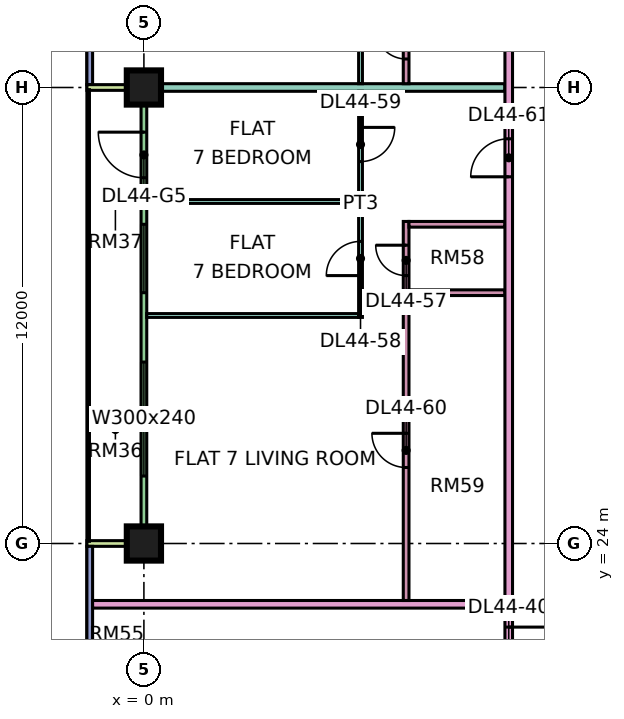
"""IFC4 building model, lengths in metres.
Left out: names, types, materials, properties, quantities, classifications, styles, units other than length and angle.
Written with IfcOpenShell. Run it as: python <this file> out.ifc"""

import sys

from ifc_helpers import new_model, si_unit, direction, frame, frame_2d, origin, origin_2d, place, context, subcontext, project, spatial, rectangle, extrude, element, fill, save


model = new_model("IFC4")
c1 = context("Model", 3, precision=1e-05, world=origin(), true_north=direction((0.0, 1.0)))
c2 = subcontext(c1, "Body", "Model", "MODEL_VIEW")
j1 = project(units=[si_unit("LENGTHUNIT", "METRE"), si_unit("PLANEANGLEUNIT", "RADIAN")], contexts=[c1])
p1 = place(None, origin())
s1 = spatial("IfcSite", under=j1, at=p1, CompositionType="ELEMENT")
p2 = place(p1, origin())
s2 = spatial("IfcBuilding", under=s1, at=p2, CompositionType="ELEMENT")
p3 = place(p2, frame((0.0, 0.0, 191.15)))
s3 = spatial("IfcBuildingStorey", under=s2, at=p3, CompositionType="ELEMENT", Elevation=191.15)
p4 = place(p3, frame((0.0, 24.0, 0.0), z_axis=(0.0, 0.0, 1.0), x_axis=(1.0, 0.0, 0.0)))
e1 = element("IfcColumn", 1, at=p4, inside=s3, PredefinedType="COLUMN", context=c2, shape_type="SweptSolid", body=[
    extrude(rectangle(XDim=0.9, YDim=0.9, at=origin_2d()), origin(), (0.0, 0.0, 1.0), 3.75),
])
p5 = place(p3, frame((0.0, 36.0, 0.0), z_axis=(0.0, 0.0, 1.0), x_axis=(1.0, 0.0, 0.0)))
e2 = element("IfcColumn", 2, at=p5, inside=s3, PredefinedType="COLUMN", context=c2, shape_type="SweptSolid", body=[
    extrude(rectangle(XDim=0.9, YDim=0.9, at=origin_2d()), origin(), (0.0, 0.0, 1.0), 3.75),
])
p6 = place(p3, frame((-1.425, 47.925, 0.0), z_axis=(0.0, 0.0, 1.0), x_axis=(0.0, -1.0, 0.0)))
e3 = element("IfcWall", 3, at=p6, inside=s3, PredefinedType="SOLIDWALL", context=c2, shape_type="SweptSolid", body=[
    extrude(rectangle(XDim=11.85, YDim=0.15, at=frame_2d((5.925, 0.0))), origin(), (0.0, 0.0, 1.0), 3.35),
])
p7 = place(p6, frame((0.562, 0.0, 0.45)))
e4 = element("IfcOpeningElement", 4, at=p7, cuts=e3, PredefinedType="OPENING", context=c2, shape_type="SweptSolid", body=[
    extrude(rectangle(XDim=1.8, YDim=2.4, at=frame_2d((0.9, 1.2))), frame((0.0, 0.085, 0.0), z_axis=(0.0, -1.0, 0.0), x_axis=(1.0, 0.0, 0.0)), (0.0, 0.0, 1.0), 0.17),
])
p8 = place(p6, frame((5.887, 0.0, 0.45)))
e5 = element("IfcOpeningElement", 5, at=p8, cuts=e3, PredefinedType="OPENING", context=c2, shape_type="SweptSolid", body=[
    extrude(rectangle(XDim=3.0, YDim=2.4, at=frame_2d((1.5, 1.2))), frame((0.0, 0.085, 0.0), z_axis=(0.0, -1.0, 0.0), x_axis=(1.0, 0.0, 0.0)), (0.0, 0.0, 1.0), 0.17),
])
p9 = place(p3, frame((0.0, 35.925, 0.0), z_axis=(0.0, 0.0, 1.0), x_axis=(0.0, -1.0, 0.0)))
e6 = element("IfcWall", 6, at=p9, inside=s3, PredefinedType="SOLIDWALL", context=c2, shape_type="SweptSolid", body=[
    extrude(rectangle(XDim=11.85, YDim=0.15, at=frame_2d((5.925, 0.0))), origin(), (0.0, 0.0, 1.0), 3.35),
])
p10 = place(p9, frame((1.1, 0.0, 0.0)))
e7 = element("IfcOpeningElement", 7, at=p10, cuts=e6, PredefinedType="OPENING", context=c2, shape_type="SweptSolid", body=[
    extrude(rectangle(XDim=1.2, YDim=2.4, at=frame_2d((0.6, 1.2))), frame((0.0, 0.085, 0.0), z_axis=(0.0, -1.0, 0.0), x_axis=(1.0, 0.0, 0.0)), (0.0, 0.0, 1.0), 0.17),
])
p11 = place(p9, frame((3.525, 0.0, 0.45)))
e8 = element("IfcOpeningElement", 8, at=p11, cuts=e6, PredefinedType="OPENING", context=c2, shape_type="SweptSolid", body=[
    extrude(rectangle(XDim=1.8, YDim=2.4, at=frame_2d((0.9, 1.2))), frame((0.0, 0.085, 0.0), z_axis=(0.0, -1.0, 0.0), x_axis=(1.0, 0.0, 0.0)), (0.0, 0.0, 1.0), 0.17),
])
p12 = place(p9, frame((7.15, 0.0, 0.45)))
e9 = element("IfcOpeningElement", 9, at=p12, cuts=e6, PredefinedType="OPENING", context=c2, shape_type="SweptSolid", body=[
    extrude(rectangle(XDim=3.0, YDim=2.4, at=frame_2d((1.5, 1.2))), frame((0.0, 0.085, 0.0), z_axis=(0.0, -1.0, 0.0), x_axis=(1.0, 0.0, 0.0)), (0.0, 0.0, 1.0), 0.17),
])
for number, where, z_axis, x_axis in (
    (10, (-1.5, 36.0, 0.0), (0.0, 0.0, 1.0), (1.0, 0.0, 0.0)),
    (11, (-1.5, 24.0, 0.0), (0.0, 0.0, 1.0), (1.0, 0.0, 0.0)),
):
    element("IfcWall", number, at=place(p3, frame(where, z_axis=z_axis, x_axis=x_axis)), inside=s3, PredefinedType="SOLIDWALL", context=c2, shape_type="SweptSolid", body=[
        extrude(rectangle(XDim=1.5, YDim=0.15, at=frame_2d((0.75, 0.0))), origin(), (0.0, 0.0, 1.0), 3.35),
    ])
p13 = place(p3, frame((-1.425, 23.925, 0.0), z_axis=(0.0, 0.0, 1.0), x_axis=(0.0, -1.0, 0.0)))
e12 = element("IfcWall", 12, at=p13, inside=s3, PredefinedType="SOLIDWALL", context=c2, shape_type="SweptSolid", body=[
    extrude(rectangle(XDim=11.425, YDim=0.15, at=frame_2d((5.712, 0.0))), origin(), (0.0, 0.0, 1.0), 3.35),
])
p14 = place(p13, frame((6.175, 0.0, 0.45)))
e13 = element("IfcOpeningElement", 13, at=p14, cuts=e12, PredefinedType="OPENING", context=c2, shape_type="SweptSolid", body=[
    extrude(rectangle(XDim=3.0, YDim=2.4, at=frame_2d((1.5, 1.2))), frame((0.0, 0.085, 0.0), z_axis=(0.0, -1.0, 0.0), x_axis=(1.0, 0.0, 0.0)), (0.0, 0.0, 1.0), 0.17),
])
p15 = place(p3, frame((-1.35, 22.4, 0.0), z_axis=(0.0, 0.0, 1.0), x_axis=(1.0, 0.0, 0.0)))
e14 = element("IfcWall", 14, at=p15, inside=s3, PredefinedType="PARTITIONING", context=c2, shape_type="SweptSolid", body=[
    extrude(rectangle(XDim=10.85, YDim=0.2, at=frame_2d((5.425, 0.0))), origin(), (0.0, 0.0, 1.0), 3.35),
])
e15 = element("IfcWall", 15, at=p5, inside=s3, PredefinedType="PARTITIONING", context=c2, shape_type="SweptSolid", body=[
    extrude(rectangle(XDim=9.5, YDim=0.2, at=frame_2d((4.75, 0.0))), origin(), (0.0, 0.0, 1.0), 3.35),
])
for number, where, z_axis, x_axis in (
    (16, (0.074, 30.0, 0.0), (0.0, 0.0, 1.0), (1.0, 0.0, 0.0)),
    (17, (0.074, 33.0, 0.0), (0.0, 0.0, 1.0), (1.0, 0.0, 0.0)),
):
    element("IfcWall", number, at=place(p3, frame(where, z_axis=z_axis, x_axis=x_axis)), inside=s3, PredefinedType="PARTITIONING", context=c2, shape_type="SweptSolid", body=[
        extrude(rectangle(XDim=5.576, YDim=0.1, at=frame_2d((2.788, 0.0))), origin(), (0.0, 0.0, 1.0), 3.35),
    ])
p16 = place(p3, frame((5.7, 29.95, 0.0), z_axis=(0.0, 0.0, 1.0), x_axis=(0.0, 1.0, 0.0)))
e18 = element("IfcWall", 18, at=p16, inside=s3, PredefinedType="PARTITIONING", context=c2, shape_type="SweptSolid", body=[
    extrude(rectangle(XDim=5.95, YDim=0.1, at=frame_2d((2.975, 0.0))), origin(), (0.0, 0.0, 1.0), 3.35),
])
p17 = place(p16, frame((1.1, 0.0, 0.0)))
e19 = element("IfcOpeningElement", 19, at=p17, cuts=e18, PredefinedType="OPENING", context=c2, shape_type="SweptSolid", body=[
    extrude(rectangle(XDim=0.9, YDim=2.1, at=frame_2d((0.45, 1.05))), frame((0.0, 0.06, 0.0), z_axis=(0.0, -1.0, 0.0), x_axis=(1.0, 0.0, 0.0)), (0.0, 0.0, 1.0), 0.12),
])
p18 = place(p16, frame((4.1, 0.0, 0.0)))
e20 = element("IfcOpeningElement", 20, at=p18, cuts=e18, PredefinedType="OPENING", context=c2, shape_type="SweptSolid", body=[
    extrude(rectangle(XDim=0.9, YDim=2.1, at=frame_2d((0.45, 1.05))), frame((0.0, 0.06, 0.0), z_axis=(0.0, -1.0, 0.0), x_axis=(1.0, 0.0, 0.0)), (0.0, 0.0, 1.0), 0.12),
])
p19 = place(p3, frame((5.7, 36.1, 0.0), z_axis=(0.0, 0.0, 1.0), x_axis=(0.0, 1.0, 0.0)))
e21 = element("IfcWall", 21, at=p19, inside=s3, PredefinedType="PARTITIONING", context=c2, shape_type="SweptSolid", body=[
    extrude(rectangle(XDim=26.826, YDim=0.1, at=frame_2d((13.413, 0.0))), origin(), (0.0, 0.0, 1.0), 3.35),
])
p20 = place(p19, frame((9.95, 0.0, 0.0)))
e22 = element("IfcOpeningElement", 22, at=p20, cuts=e21, PredefinedType="OPENING", context=c2, shape_type="SweptSolid", body=[
    extrude(rectangle(XDim=0.9, YDim=2.1, at=frame_2d((0.45, 1.05))), frame((0.0, 0.06, 0.0), z_axis=(0.0, -1.0, 0.0), x_axis=(1.0, 0.0, 0.0)), (0.0, 0.0, 1.0), 0.12),
])
p21 = place(p19, frame((12.95, 0.0, 0.0)))
e23 = element("IfcOpeningElement", 23, at=p21, cuts=e21, PredefinedType="OPENING", context=c2, shape_type="SweptSolid", body=[
    extrude(rectangle(XDim=0.9, YDim=2.1, at=frame_2d((0.45, 1.05))), frame((0.0, 0.06, 0.0), z_axis=(0.0, -1.0, 0.0), x_axis=(1.0, 0.0, 0.0)), (0.0, 0.0, 1.0), 0.12),
])
p22 = place(p19, frame((15.95, 0.0, 0.0)))
e24 = element("IfcOpeningElement", 24, at=p22, cuts=e21, PredefinedType="OPENING", context=c2, shape_type="SweptSolid", body=[
    extrude(rectangle(XDim=0.9, YDim=2.1, at=frame_2d((0.45, 1.05))), frame((0.0, 0.06, 0.0), z_axis=(0.0, -1.0, 0.0), x_axis=(1.0, 0.0, 0.0)), (0.0, 0.0, 1.0), 0.12),
])
p23 = place(p19, frame((18.95, 0.0, 0.0)))
e25 = element("IfcOpeningElement", 25, at=p23, cuts=e21, PredefinedType="OPENING", context=c2, shape_type="SweptSolid", body=[
    extrude(rectangle(XDim=0.9, YDim=2.1, at=frame_2d((0.45, 1.05))), frame((0.0, 0.06, 0.0), z_axis=(0.0, -1.0, 0.0), x_axis=(1.0, 0.0, 0.0)), (0.0, 0.0, 1.0), 0.12),
])
p24 = place(p19, frame((24.95, 0.0, 0.0)))
e26 = element("IfcOpeningElement", 26, at=p24, cuts=e21, PredefinedType="OPENING", context=c2, shape_type="SweptSolid", body=[
    extrude(rectangle(XDim=0.9, YDim=2.1, at=frame_2d((0.45, 1.05))), frame((0.0, 0.06, 0.0), z_axis=(0.0, -1.0, 0.0), x_axis=(1.0, 0.0, 0.0)), (0.0, 0.0, 1.0), 0.12),
])
p25 = place(p19, frame((3.95, 0.0, 0.0)))
e27 = element("IfcOpeningElement", 27, at=p25, cuts=e21, PredefinedType="OPENING", context=c2, shape_type="SweptSolid", body=[
    extrude(rectangle(XDim=0.9, YDim=2.1, at=frame_2d((0.45, 1.05))), frame((0.0, 0.06, 0.0), z_axis=(0.0, -1.0, 0.0), x_axis=(1.0, 0.0, 0.0)), (0.0, 0.0, 1.0), 0.12),
])
p26 = place(p19, frame((21.95, 0.0, 0.0)))
e28 = element("IfcOpeningElement", 28, at=p26, cuts=e21, PredefinedType="OPENING", context=c2, shape_type="SweptSolid", body=[
    extrude(rectangle(XDim=0.9, YDim=2.1, at=frame_2d((0.45, 1.05))), frame((0.0, 0.06, 0.0), z_axis=(0.0, -1.0, 0.0), x_axis=(1.0, 0.0, 0.0)), (0.0, 0.0, 1.0), 0.12),
])
p27 = place(p3, frame((6.9, 22.5, 0.0), z_axis=(0.0, 0.0, 1.0), x_axis=(0.0, 1.0, 0.0)))
e29 = element("IfcWall", 29, at=p27, inside=s3, PredefinedType="PARTITIONING", context=c2, shape_type="SweptSolid", body=[
    extrude(rectangle(XDim=9.975, YDim=0.15, at=frame_2d((4.988, 0.0))), origin(), (0.0, 0.0, 1.0), 3.35),
])
p28 = place(p27, frame((8.55, 0.0, 0.0)))
e30 = element("IfcOpeningElement", 30, at=p28, cuts=e29, PredefinedType="OPENING", context=c2, shape_type="SweptSolid", body=[
    extrude(rectangle(XDim=0.8, YDim=2.1, at=frame_2d((0.4, 1.05))), frame((0.0, 0.085, 0.0), z_axis=(0.0, -1.0, 0.0), x_axis=(1.0, 0.0, 0.0)), (0.0, 0.0, 1.0), 0.17),
])
p29 = place(p27, frame((3.5, 0.0, 0.0)))
e31 = element("IfcOpeningElement", 31, at=p29, cuts=e29, PredefinedType="OPENING", context=c2, shape_type="SweptSolid", body=[
    extrude(rectangle(XDim=0.9, YDim=2.1, at=frame_2d((0.45, 1.05))), frame((0.0, 0.085, 0.0), z_axis=(0.0, -1.0, 0.0), x_axis=(1.0, 0.0, 0.0)), (0.0, 0.0, 1.0), 0.17),
])
p30 = place(p3, frame((6.9, 36.1, 0.0), z_axis=(0.0, 0.0, 1.0), x_axis=(0.0, 1.0, 0.0)))
e32 = element("IfcWall", 32, at=p30, inside=s3, PredefinedType="PARTITIONING", context=c2, shape_type="SweptSolid", body=[
    extrude(rectangle(XDim=14.675, YDim=0.15, at=frame_2d((7.337, 0.0))), origin(), (0.0, 0.0, 1.0), 3.35),
])
p31 = place(p30, frame((7.55, 0.0, 0.0)))
e33 = element("IfcOpeningElement", 33, at=p31, cuts=e32, PredefinedType="OPENING", context=c2, shape_type="SweptSolid", body=[
    extrude(rectangle(XDim=0.8, YDim=2.1, at=frame_2d((0.4, 1.05))), frame((0.0, 0.085, 0.0), z_axis=(0.0, -1.0, 0.0), x_axis=(1.0, 0.0, 0.0)), (0.0, 0.0, 1.0), 0.17),
])
p32 = place(p30, frame((0.65, 0.0, 0.0)))
e34 = element("IfcOpeningElement", 34, at=p32, cuts=e32, PredefinedType="OPENING", context=c2, shape_type="SweptSolid", body=[
    extrude(rectangle(XDim=0.8, YDim=2.1, at=frame_2d((0.4, 1.05))), frame((0.0, 0.085, 0.0), z_axis=(0.0, -1.0, 0.0), x_axis=(1.0, 0.0, 0.0)), (0.0, 0.0, 1.0), 0.17),
])
p33 = place(p30, frame((10.25, 0.0, 0.0)))
e35 = element("IfcOpeningElement", 35, at=p33, cuts=e32, PredefinedType="OPENING", context=c2, shape_type="SweptSolid", body=[
    extrude(rectangle(XDim=0.8, YDim=2.1, at=frame_2d((0.4, 1.05))), frame((0.0, 0.085, 0.0), z_axis=(0.0, -1.0, 0.0), x_axis=(1.0, 0.0, 0.0)), (0.0, 0.0, 1.0), 0.17),
])
p34 = place(p30, frame((3.95, 0.0, 0.0)))
e36 = element("IfcOpeningElement", 36, at=p34, cuts=e32, PredefinedType="OPENING", context=c2, shape_type="SweptSolid", body=[
    extrude(rectangle(XDim=0.9, YDim=2.1, at=frame_2d((0.45, 1.05))), frame((0.0, 0.085, 0.0), z_axis=(0.0, -1.0, 0.0), x_axis=(1.0, 0.0, 0.0)), (0.0, 0.0, 1.0), 0.17),
])
for number, where, z_axis, x_axis in (
    (37, (6.975, 30.6, 0.0), (0.0, 0.0, 1.0), (1.0, 0.0, 0.0)),
    (38, (6.975, 32.4, 0.0), (0.0, 0.0, 1.0), (1.0, 0.0, 0.0)),
):
    element("IfcWall", number, at=place(p3, frame(where, z_axis=z_axis, x_axis=x_axis)), inside=s3, PredefinedType="PARTITIONING", context=c2, shape_type="SweptSolid", body=[
        extrude(rectangle(XDim=2.525, YDim=0.15, at=frame_2d((1.262, 0.0))), origin(), (0.0, 0.0, 1.0), 3.35),
    ])
p35 = place(p3, frame((9.6, 20.0, 0.0), z_axis=(0.0, 0.0, 1.0), x_axis=(0.0, 1.0, 0.0)))
e39 = element("IfcWall", 39, at=p35, inside=s3, PredefinedType="PARTITIONING", context=c2, shape_type="SweptSolid", body=[
    extrude(rectangle(XDim=42.926, YDim=0.2, at=frame_2d((21.463, 0.0))), origin(), (0.0, 0.0, 1.0), 3.35),
])
p36 = place(p35, frame((31.65, 0.0, 0.0)))
e40 = element("IfcOpeningElement", 40, at=p36, cuts=e39, PredefinedType="OPENING", context=c2, shape_type="SweptSolid", body=[
    extrude(rectangle(XDim=1.0, YDim=2.1, at=frame_2d((0.5, 1.05))), frame((0.0, 0.11, 0.0), z_axis=(0.0, -1.0, 0.0), x_axis=(1.0, 0.0, 0.0)), (0.0, 0.0, 1.0), 0.22),
])
p37 = place(p35, frame((0.6, 0.0, 0.0)))
e41 = element("IfcOpeningElement", 41, at=p37, cuts=e39, PredefinedType="OPENING", context=c2, shape_type="SweptSolid", body=[
    extrude(rectangle(XDim=1.2, YDim=2.1, at=frame_2d((0.6, 1.05))), frame((0.0, 0.11, 0.0), z_axis=(0.0, -1.0, 0.0), x_axis=(1.0, 0.0, 0.0)), (0.0, 0.0, 1.0), 0.22),
])
p38 = place(p35, frame((13.65, 0.0, 0.0)))
e42 = element("IfcOpeningElement", 42, at=p38, cuts=e39, PredefinedType="OPENING", context=c2, shape_type="SweptSolid", body=[
    extrude(rectangle(XDim=1.0, YDim=2.1, at=frame_2d((0.5, 1.05))), frame((0.0, 0.11, 0.0), z_axis=(0.0, -1.0, 0.0), x_axis=(1.0, 0.0, 0.0)), (0.0, 0.0, 1.0), 0.22),
])
p39 = place(p10, frame((1.2, 0.0, 0.0), z_axis=(0.0, 0.0, 1.0), x_axis=(-1.0, 0.0, 0.0)))
e43 = element("IfcDoor", 43, at=p39, inside=s3, OperationType="DOUBLE_DOOR_SINGLE_SWING", PredefinedType="DOOR", context=c2, shape_type="SweptSolid", body=[
    extrude(rectangle(XDim=1.2, YDim=2.4, at=frame_2d((0.6, 1.2))), frame((0.0, 0.025, 0.0), z_axis=(0.0, -1.0, 0.0), x_axis=(1.0, 0.0, 0.0)), (0.0, 0.0, 1.0), 0.05),
])
fill(e7, e43)
p40 = place(p11, origin())
e44 = element("IfcWindow", 44, at=p40, inside=s3, PartitioningType="SINGLE_PANEL", PredefinedType="WINDOW", context=c2, shape_type="SweptSolid", body=[
    extrude(rectangle(XDim=1.8, YDim=2.4, at=frame_2d((0.9, 1.2))), frame((0.0, 0.03, 0.0), z_axis=(0.0, -1.0, 0.0), x_axis=(1.0, 0.0, 0.0)), (0.0, 0.0, 1.0), 0.06),
])
fill(e8, e44)
p41 = place(p12, origin())
e45 = element("IfcWindow", 45, at=p41, inside=s3, PartitioningType="SINGLE_PANEL", PredefinedType="WINDOW", context=c2, shape_type="SweptSolid", body=[
    extrude(rectangle(XDim=3.0, YDim=2.4, at=frame_2d((1.5, 1.2))), frame((0.0, 0.03, 0.0), z_axis=(0.0, -1.0, 0.0), x_axis=(1.0, 0.0, 0.0)), (0.0, 0.0, 1.0), 0.06),
])
fill(e9, e45)
p42 = place(p32, frame((0.8, 0.0, 0.0), z_axis=(0.0, 0.0, 1.0), x_axis=(-1.0, 0.0, 0.0)))
e46 = element("IfcDoor", 46, at=p42, inside=s3, OperationType="SINGLE_SWING_RIGHT", PredefinedType="DOOR", context=c2, shape_type="SweptSolid", body=[
    extrude(rectangle(XDim=0.8, YDim=2.1, at=frame_2d((0.4, 1.05))), frame((0.0, 0.025, 0.0), z_axis=(0.0, -1.0, 0.0), x_axis=(1.0, 0.0, 0.0)), (0.0, 0.0, 1.0), 0.05),
])
fill(e34, e46)
p43 = place(p37, origin())
e47 = element("IfcDoor", 47, at=p43, inside=s3, OperationType="SINGLE_SWING_RIGHT", PredefinedType="DOOR", context=c2, shape_type="SweptSolid", body=[
    extrude(rectangle(XDim=1.2, YDim=2.1, at=frame_2d((0.6, 1.05))), frame((0.0, 0.025, 0.0), z_axis=(0.0, -1.0, 0.0), x_axis=(1.0, 0.0, 0.0)), (0.0, 0.0, 1.0), 0.05),
])
fill(e41, e47)
p44 = place(p28, frame((0.8, 0.0, 0.0), z_axis=(0.0, 0.0, 1.0), x_axis=(-1.0, 0.0, 0.0)))
e48 = element("IfcDoor", 48, at=p44, inside=s3, OperationType="SINGLE_SWING_RIGHT", PredefinedType="DOOR", context=c2, shape_type="SweptSolid", body=[
    extrude(rectangle(XDim=0.8, YDim=2.1, at=frame_2d((0.4, 1.05))), frame((0.0, 0.025, 0.0), z_axis=(0.0, -1.0, 0.0), x_axis=(1.0, 0.0, 0.0)), (0.0, 0.0, 1.0), 0.05),
])
fill(e30, e48)
p45 = place(p17, origin())
e49 = element("IfcDoor", 49, at=p45, inside=s3, OperationType="SINGLE_SWING_LEFT", PredefinedType="DOOR", context=c2, shape_type="SweptSolid", body=[
    extrude(rectangle(XDim=0.9, YDim=2.1, at=frame_2d((0.45, 1.05))), frame((0.0, 0.025, 0.0), z_axis=(0.0, -1.0, 0.0), x_axis=(1.0, 0.0, 0.0)), (0.0, 0.0, 1.0), 0.05),
])
fill(e19, e49)
p46 = place(p18, origin())
e50 = element("IfcDoor", 50, at=p46, inside=s3, OperationType="SINGLE_SWING_RIGHT", PredefinedType="DOOR", context=c2, shape_type="SweptSolid", body=[
    extrude(rectangle(XDim=0.9, YDim=2.1, at=frame_2d((0.45, 1.05))), frame((0.0, 0.025, 0.0), z_axis=(0.0, -1.0, 0.0), x_axis=(1.0, 0.0, 0.0)), (0.0, 0.0, 1.0), 0.05),
])
fill(e20, e50)
p47 = place(p29, frame((0.9, 0.0, 0.0), z_axis=(0.0, 0.0, 1.0), x_axis=(-1.0, 0.0, 0.0)))
e51 = element("IfcDoor", 51, at=p47, inside=s3, OperationType="SINGLE_SWING_RIGHT", PredefinedType="DOOR", context=c2, shape_type="SweptSolid", body=[
    extrude(rectangle(XDim=0.9, YDim=2.1, at=frame_2d((0.45, 1.05))), frame((0.0, 0.025, 0.0), z_axis=(0.0, -1.0, 0.0), x_axis=(1.0, 0.0, 0.0)), (0.0, 0.0, 1.0), 0.05),
])
fill(e31, e51)
p48 = place(p38, origin())
e52 = element("IfcDoor", 52, at=p48, inside=s3, OperationType="SINGLE_SWING_LEFT", PredefinedType="DOOR", context=c2, shape_type="SweptSolid", body=[
    extrude(rectangle(XDim=1.0, YDim=2.1, at=frame_2d((0.5, 1.05))), frame((0.0, 0.025, 0.0), z_axis=(0.0, -1.0, 0.0), x_axis=(1.0, 0.0, 0.0)), (0.0, 0.0, 1.0), 0.05),
])
fill(e42, e52)
save(model, sys.argv[1])
